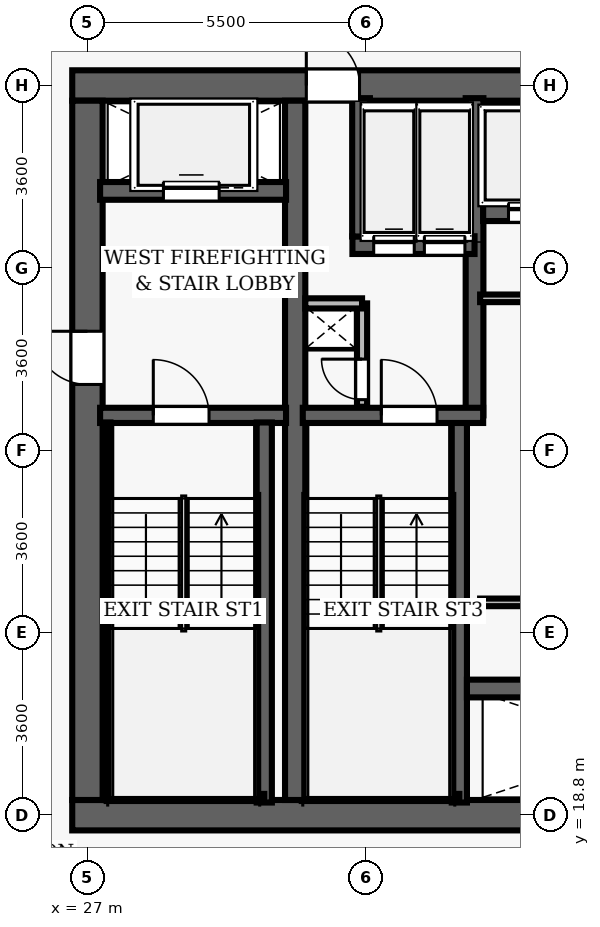
"""IFC4 building model, lengths in metres.
Left out: names, types, materials, properties, quantities, classifications, styles, units other than length and angle.
Written with IfcOpenShell. Run it as: python <this file> out.ifc"""

import sys

from ifc_helpers import new_model, si_unit, direction, frame, frame_2d, origin, place, context, subcontext, project, spatial, rectangle, extrude, element, fill, save


model = new_model("IFC4")
c1 = context("Model", 3, precision=1e-05, world=origin(), true_north=direction((0.0, 1.0)))
c2 = subcontext(c1, "Body", "Model", "MODEL_VIEW")
j1 = project(units=[si_unit("LENGTHUNIT", "METRE"), si_unit("PLANEANGLEUNIT", "RADIAN")], contexts=[c1])
p1 = place(None, origin())
s1 = spatial("IfcSite", under=j1, at=p1, CompositionType="ELEMENT")
p2 = place(p1, origin())
s2 = spatial("IfcBuilding", under=s1, at=p2, CompositionType="ELEMENT")
p3 = place(p2, frame((0.0, 0.0, 72.9)))
s3 = spatial("IfcBuildingStorey", under=s2, at=p3, CompositionType="ELEMENT", Elevation=72.9)
p4 = place(p3, frame((26.7, 18.8, 0.0), z_axis=(0.0, 0.0, 1.0), x_axis=(1.0, 0.0, 0.0)))
e1 = element("IfcWall", 1, at=p4, inside=s3, PredefinedType="SHEAR", context=c2, shape_type="SweptSolid", body=[
    extrude(rectangle(XDim=22.6, YDim=0.6, at=frame_2d((11.3, 0.0))), origin(), (0.0, 0.0, 1.0), 3.5),
])
p5 = place(p4, frame((14.52, 0.0, 0.0)))
e2 = element("IfcOpeningElement", 2, at=p5, cuts=e1, PredefinedType="OPENING", context=c2, shape_type="SweptSolid", body=[
    extrude(rectangle(XDim=1.05, YDim=2.15, at=frame_2d((0.525, 1.075))), frame((0.0, 0.31, 0.0), z_axis=(0.0, -1.0, 0.0), x_axis=(1.0, 0.0, 0.0)), (0.0, 0.0, 1.0), 0.62),
])
p6 = place(p3, frame((26.7, 33.2, 0.0), z_axis=(0.0, 0.0, 1.0), x_axis=(1.0, 0.0, 0.0)))
e3 = element("IfcWall", 3, at=p6, inside=s3, PredefinedType="SHEAR", context=c2, shape_type="SweptSolid", body=[
    extrude(rectangle(XDim=22.6, YDim=0.6, at=frame_2d((11.3, 0.0))), origin(), (0.0, 0.0, 1.0), 3.5),
])
p7 = place(p6, frame((4.62, 0.0, 0.0)))
e4 = element("IfcOpeningElement", 4, at=p7, cuts=e3, PredefinedType="OPENING", context=c2, shape_type="SweptSolid", body=[
    extrude(rectangle(XDim=1.05, YDim=2.15, at=frame_2d((0.525, 1.075))), frame((0.0, 0.31, 0.0), z_axis=(0.0, -1.0, 0.0), x_axis=(1.0, 0.0, 0.0)), (0.0, 0.0, 1.0), 0.62),
])
p8 = place(p6, frame((14.52, 0.0, 0.0)))
e5 = element("IfcOpeningElement", 5, at=p8, cuts=e3, PredefinedType="OPENING", context=c2, shape_type="SweptSolid", body=[
    extrude(rectangle(XDim=1.05, YDim=2.15, at=frame_2d((0.525, 1.075))), frame((0.0, 0.31, 0.0), z_axis=(0.0, -1.0, 0.0), x_axis=(1.0, 0.0, 0.0)), (0.0, 0.0, 1.0), 0.62),
])
p9 = place(p3, frame((27.0, 19.1, 0.0), z_axis=(0.0, 0.0, 1.0), x_axis=(0.0, 1.0, 0.0)))
e6 = element("IfcWall", 6, at=p9, inside=s3, PredefinedType="SHEAR", context=c2, shape_type="SweptSolid", body=[
    extrude(rectangle(XDim=13.8, YDim=0.6, at=frame_2d((6.9, 0.0))), origin(), (0.0, 0.0, 1.0), 3.5),
])
p10 = place(p9, frame((8.2, 0.0, 0.0)))
e7 = element("IfcOpeningElement", 7, at=p10, cuts=e6, PredefinedType="OPENING", context=c2, shape_type="SweptSolid", body=[
    extrude(rectangle(XDim=1.05, YDim=2.15, at=frame_2d((0.525, 1.075))), frame((0.0, 0.31, 0.0), z_axis=(0.0, -1.0, 0.0), x_axis=(1.0, 0.0, 0.0)), (0.0, 0.0, 1.0), 0.62),
])
p11 = place(p3, frame((31.1, 19.1, 0.0), z_axis=(0.0, 0.0, 1.0), x_axis=(0.0, 1.0, 0.0)))
e8 = element("IfcWall", 8, at=p11, inside=s3, PredefinedType="SHEAR", context=c2, shape_type="SweptSolid", body=[
    extrude(rectangle(XDim=13.8, YDim=0.4, at=frame_2d((6.9, 0.0))), origin(), (0.0, 0.0, 1.0), 3.5),
])
p12 = place(p3, frame((27.25, 26.69, 0.0), z_axis=(0.0, 0.0, 1.0), x_axis=(1.0, 0.0, 0.0)))
e9 = element("IfcWall", 9, at=p12, inside=s3, PredefinedType="SHEAR", context=c2, shape_type="SweptSolid", body=[
    extrude(rectangle(XDim=3.67, YDim=0.3, at=frame_2d((1.835, 0.0))), origin(), (0.0, 0.0, 1.0), 3.5),
])
p13 = place(p12, frame((1.05, 0.0, 0.0)))
e10 = element("IfcOpeningElement", 10, at=p13, cuts=e9, PredefinedType="OPENING", context=c2, shape_type="SweptSolid", body=[
    extrude(rectangle(XDim=1.1, YDim=2.15, at=frame_2d((0.55, 1.075))), frame((0.0, 0.16, 0.0), z_axis=(0.0, -1.0, 0.0), x_axis=(1.0, 0.0, 0.0)), (0.0, 0.0, 1.0), 0.32),
])
p14 = place(p3, frame((30.49, 19.05, 0.0), z_axis=(0.0, 0.0, 1.0), x_axis=(0.0, 1.0, 0.0)))
e11 = element("IfcWall", 11, at=p14, inside=s3, PredefinedType="SHEAR", context=c2, shape_type="SweptSolid", body=[
    extrude(rectangle(XDim=7.5, YDim=0.3, at=frame_2d((3.75, 0.0))), origin(), (0.0, 0.0, 1.0), 3.5),
])
p15 = place(p3, frame((27.395, 19.1, 0.0), z_axis=(0.0, 0.0, 1.0), x_axis=(0.0, 1.0, 0.0)))
e12 = element("IfcWall", 12, at=p15, inside=s3, PredefinedType="SHEAR", context=c2, shape_type="SweptSolid", body=[
    extrude(rectangle(XDim=7.45, YDim=0.12, at=frame_2d((3.725, 0.0))), origin(), (0.0, 0.0, 1.0), 3.5),
])
p16 = place(p3, frame((27.395, 19.16, 0.0), z_axis=(0.0, 0.0, 1.0), x_axis=(1.0, 0.0, 0.0)))
e13 = element("IfcWall", 13, at=p16, inside=s3, PredefinedType="SHEAR", context=c2, shape_type="SweptSolid", body=[
    extrude(rectangle(XDim=3.095, YDim=0.12, at=frame_2d((1.547, 0.0))), origin(), (0.0, 0.0, 1.0), 3.5),
])
p17 = place(p3, frame((27.25, 31.12, 0.0), z_axis=(0.0, 0.0, 1.0), x_axis=(1.0, 0.0, 0.0)))
e14 = element("IfcWall", 14, at=p17, inside=s3, PredefinedType="SHEAR", context=c2, shape_type="SweptSolid", body=[
    extrude(rectangle(XDim=3.67, YDim=0.35, at=frame_2d((1.835, 0.0))), origin(), (0.0, 0.0, 1.0), 2.6),
])
p18 = place(p17, frame((1.25, 0.0, 0.0)))
e15 = element("IfcOpeningElement", 15, at=p18, cuts=e14, PredefinedType="OPENING", context=c2, shape_type="SweptSolid", body=[
    extrude(rectangle(XDim=1.1, YDim=2.15, at=frame_2d((0.55, 1.075))), frame((0.0, 0.185, 0.0), z_axis=(0.0, -1.0, 0.0), x_axis=(1.0, 0.0, 0.0)), (0.0, 0.0, 1.0), 0.37),
])
p19 = place(p3, frame((34.34, 19.05, 0.0), z_axis=(0.0, 0.0, 1.0), x_axis=(0.0, 1.0, 0.0)))
e16 = element("IfcWall", 16, at=p19, inside=s3, PredefinedType="SHEAR", context=c2, shape_type="SweptSolid", body=[
    extrude(rectangle(XDim=7.5, YDim=0.3, at=frame_2d((3.75, 0.0))), origin(), (0.0, 0.0, 1.0), 3.5),
])
p20 = place(p3, frame((34.64, 26.69, 0.0), z_axis=(0.0, 0.0, 1.0), x_axis=(0.0, 1.0, 0.0)))
e17 = element("IfcWall", 17, at=p20, inside=s3, PredefinedType="SHEAR", context=c2, shape_type="SweptSolid", body=[
    extrude(rectangle(XDim=6.26, YDim=0.35, at=frame_2d((3.13, 0.0))), origin(), (0.0, 0.0, 1.0), 3.5),
])
p21 = place(p3, frame((31.25, 26.69, 0.0), z_axis=(0.0, 0.0, 1.0), x_axis=(1.0, 0.0, 0.0)))
e18 = element("IfcWall", 18, at=p21, inside=s3, PredefinedType="SHEAR", context=c2, shape_type="SweptSolid", body=[
    extrude(rectangle(XDim=3.56, YDim=0.3, at=frame_2d((1.78, 0.0))), origin(), (0.0, 0.0, 1.0), 3.5),
])
p22 = place(p21, frame((1.55, 0.0, 0.0)))
e19 = element("IfcOpeningElement", 19, at=p22, cuts=e18, PredefinedType="OPENING", context=c2, shape_type="SweptSolid", body=[
    extrude(rectangle(XDim=1.1, YDim=2.15, at=frame_2d((0.55, 1.075))), frame((0.0, 0.16, 0.0), z_axis=(0.0, -1.0, 0.0), x_axis=(1.0, 0.0, 0.0)), (0.0, 0.0, 1.0), 0.32),
])
p23 = place(p3, frame((31.3, 19.16, 0.0), z_axis=(0.0, 0.0, 1.0), x_axis=(1.0, 0.0, 0.0)))
e20 = element("IfcWall", 20, at=p23, inside=s3, PredefinedType="SHEAR", context=c2, shape_type="SweptSolid", body=[
    extrude(rectangle(XDim=3.04, YDim=0.12, at=frame_2d((1.52, 0.0))), origin(), (0.0, 0.0, 1.0), 3.5),
])
p24 = place(p3, frame((32.23, 30.05, 0.0), z_axis=(0.0, 0.0, 1.0), x_axis=(1.0, 0.0, 0.0)))
e21 = element("IfcWall", 21, at=p24, inside=s3, PredefinedType="SHEAR", context=c2, shape_type="SweptSolid", body=[
    extrude(rectangle(XDim=2.41, YDim=0.35, at=frame_2d((1.205, 0.0))), origin(), (0.0, 0.0, 1.0), 2.6),
])
p25 = place(p24, frame((0.42, 0.0, 0.0)))
e22 = element("IfcOpeningElement", 22, at=p25, cuts=e21, PredefinedType="OPENING", context=c2, shape_type="SweptSolid", body=[
    extrude(rectangle(XDim=0.8, YDim=2.15, at=frame_2d((0.4, 1.075))), frame((0.0, 0.185, 0.0), z_axis=(0.0, -1.0, 0.0), x_axis=(1.0, 0.0, 0.0)), (0.0, 0.0, 1.0), 0.37),
])
p26 = place(p24, frame((1.42, 0.0, 0.0)))
e23 = element("IfcOpeningElement", 23, at=p26, cuts=e21, PredefinedType="OPENING", context=c2, shape_type="SweptSolid", body=[
    extrude(rectangle(XDim=0.8, YDim=2.15, at=frame_2d((0.4, 1.075))), frame((0.0, 0.185, 0.0), z_axis=(0.0, -1.0, 0.0), x_axis=(1.0, 0.0, 0.0)), (0.0, 0.0, 1.0), 0.37),
])
p27 = place(p3, frame((32.4, 30.22, 0.0), z_axis=(0.0, 0.0, 1.0), x_axis=(0.0, 1.0, 0.0)))
e24 = element("IfcWall", 24, at=p27, inside=s3, PredefinedType="SHEAR", context=c2, shape_type="SweptSolid", body=[
    extrude(rectangle(XDim=2.73, YDim=0.35, at=frame_2d((1.365, 0.0))), origin(), (0.0, 0.0, 1.0), 2.6),
])
p28 = place(p3, frame((32.42, 26.86, 0.0), z_axis=(0.0, 0.0, 1.0), x_axis=(0.0, 1.0, 0.0)))
e25 = element("IfcWall", 25, at=p28, inside=s3, PredefinedType="PARTITIONING", context=c2, shape_type="SweptSolid", body=[
    extrude(rectangle(XDim=2.04, YDim=0.2, at=frame_2d((1.02, 0.0))), origin(), (0.0, 0.0, 1.0), 2.6),
])
p29 = place(p28, frame((0.14, 0.0, 0.0)))
e26 = element("IfcOpeningElement", 26, at=p29, cuts=e25, PredefinedType="OPENING", context=c2, shape_type="SweptSolid", body=[
    extrude(rectangle(XDim=0.8, YDim=2.05, at=frame_2d((0.4, 1.025))), frame((0.0, 0.11, 0.0), z_axis=(0.0, -1.0, 0.0), x_axis=(1.0, 0.0, 0.0)), (0.0, 0.0, 1.0), 0.22),
])
p30 = place(p3, frame((31.3, 28.9, 0.0), z_axis=(0.0, 0.0, 1.0), x_axis=(1.0, 0.0, 0.0)))
e27 = element("IfcWall", 27, at=p30, inside=s3, PredefinedType="PARTITIONING", context=c2, shape_type="SweptSolid", body=[
    extrude(rectangle(XDim=1.12, YDim=0.2, at=frame_2d((0.56, 0.0))), origin(), (0.0, 0.0, 1.0), 2.6),
])
p31 = place(p3, frame((34.81, 30.7, 0.0), z_axis=(0.0, 0.0, 1.0), x_axis=(1.0, 0.0, 0.0)))
e28 = element("IfcWall", 28, at=p31, inside=s3, PredefinedType="SHEAR", context=c2, shape_type="SweptSolid", body=[
    extrude(rectangle(XDim=6.36, YDim=0.35, at=frame_2d((3.18, 0.0))), origin(), (0.0, 0.0, 1.0), 2.6),
])
p32 = place(p31, frame((0.5, 0.0, 0.0)))
e29 = element("IfcOpeningElement", 29, at=p32, cuts=e28, PredefinedType="OPENING", context=c2, shape_type="SweptSolid", body=[
    extrude(rectangle(XDim=0.9, YDim=2.15, at=frame_2d((0.45, 1.075))), frame((0.0, 0.185, 0.0), z_axis=(0.0, -1.0, 0.0), x_axis=(1.0, 0.0, 0.0)), (0.0, 0.0, 1.0), 0.37),
])
p33 = place(p31, frame((2.58, 0.0, 0.0)))
e30 = element("IfcOpeningElement", 30, at=p33, cuts=e28, PredefinedType="OPENING", context=c2, shape_type="SweptSolid", body=[
    extrude(rectangle(XDim=0.9, YDim=2.15, at=frame_2d((0.45, 1.075))), frame((0.0, 0.185, 0.0), z_axis=(0.0, -1.0, 0.0), x_axis=(1.0, 0.0, 0.0)), (0.0, 0.0, 1.0), 0.37),
])
p34 = place(p31, frame((4.66, 0.0, 0.0)))
e31 = element("IfcOpeningElement", 31, at=p34, cuts=e28, PredefinedType="OPENING", context=c2, shape_type="SweptSolid", body=[
    extrude(rectangle(XDim=0.9, YDim=2.15, at=frame_2d((0.45, 1.075))), frame((0.0, 0.185, 0.0), z_axis=(0.0, -1.0, 0.0), x_axis=(1.0, 0.0, 0.0)), (0.0, 0.0, 1.0), 0.37),
])
p35 = place(p3, frame((34.49, 21.3, 0.0), z_axis=(0.0, 0.0, 1.0), x_axis=(1.0, 0.0, 0.0)))
e32 = element("IfcWall", 32, at=p35, inside=s3, PredefinedType="SHEAR", context=c2, shape_type="SweptSolid", body=[
    extrude(rectangle(XDim=6.68, YDim=0.35, at=frame_2d((3.34, 0.0))), origin(), (0.0, 0.0, 1.0), 2.6),
])
for number, where, z_axis, x_axis in (
    (33, (34.75, 29.0, 0.0), (0.0, 0.0, 1.0), (1.0, 0.0, 0.0)),
    (34, (34.75, 23.0, 0.0), (0.0, 0.0, 1.0), (1.0, 0.0, 0.0)),
):
    element("IfcWall", number, at=place(p3, frame(where, z_axis=z_axis, x_axis=x_axis)), inside=s3, PredefinedType="PARTITIONING", context=c2, shape_type="SweptSolid", body=[
        extrude(rectangle(XDim=6.25, YDim=0.15, at=frame_2d((3.125, 0.0))), origin(), (0.0, 0.0, 1.0), 2.6),
    ])
p36 = place(p13, origin())
e35 = element("IfcDoor", 35, at=p36, inside=s3, OperationType="SINGLE_SWING_LEFT", PredefinedType="DOOR", context=c2, shape_type="SweptSolid", body=[
    extrude(rectangle(XDim=1.1, YDim=2.15, at=frame_2d((0.55, 1.075))), frame((0.0, 0.025, 0.0), z_axis=(0.0, -1.0, 0.0), x_axis=(1.0, 0.0, 0.0)), (0.0, 0.0, 1.0), 0.05),
])
fill(e10, e35)
p37 = place(p10, origin())
e36 = element("IfcDoor", 36, at=p37, inside=s3, OperationType="SINGLE_SWING_RIGHT", PredefinedType="DOOR", context=c2, shape_type="SweptSolid", body=[
    extrude(rectangle(XDim=1.05, YDim=2.15, at=frame_2d((0.525, 1.075))), frame((0.0, 0.025, 0.0), z_axis=(0.0, -1.0, 0.0), x_axis=(1.0, 0.0, 0.0)), (0.0, 0.0, 1.0), 0.05),
])
fill(e7, e36)
p38 = place(p22, origin())
e37 = element("IfcDoor", 37, at=p38, inside=s3, OperationType="SINGLE_SWING_LEFT", PredefinedType="DOOR", context=c2, shape_type="SweptSolid", body=[
    extrude(rectangle(XDim=1.1, YDim=2.15, at=frame_2d((0.55, 1.075))), frame((0.0, 0.025, 0.0), z_axis=(0.0, -1.0, 0.0), x_axis=(1.0, 0.0, 0.0)), (0.0, 0.0, 1.0), 0.05),
])
fill(e19, e37)
p39 = place(p29, origin())
e38 = element("IfcDoor", 38, at=p39, inside=s3, OperationType="SINGLE_SWING_RIGHT", PredefinedType="DOOR", context=c2, shape_type="SweptSolid", body=[
    extrude(rectangle(XDim=0.8, YDim=2.05, at=frame_2d((0.4, 1.025))), frame((0.0, 0.025, 0.0), z_axis=(0.0, -1.0, 0.0), x_axis=(1.0, 0.0, 0.0)), (0.0, 0.0, 1.0), 0.05),
])
fill(e26, e38)
p40 = place(p7, origin())
e39 = element("IfcDoor", 39, at=p40, inside=s3, OperationType="SINGLE_SWING_LEFT", PredefinedType="DOOR", context=c2, shape_type="SweptSolid", body=[
    extrude(rectangle(XDim=1.05, YDim=2.15, at=frame_2d((0.525, 1.075))), frame((0.0, 0.025, 0.0), z_axis=(0.0, -1.0, 0.0), x_axis=(1.0, 0.0, 0.0)), (0.0, 0.0, 1.0), 0.05),
])
fill(e4, e39)
p41 = place(p32, origin())
e40 = element("IfcDoor", 40, at=p41, inside=s3, OperationType="SLIDING_TO_LEFT", PredefinedType="DOOR", context=c2, shape_type="SweptSolid", body=[
    extrude(rectangle(XDim=0.9, YDim=2.15, at=frame_2d((0.45, 1.075))), frame((0.0, 0.025, 0.0), z_axis=(0.0, -1.0, 0.0), x_axis=(1.0, 0.0, 0.0)), (0.0, 0.0, 1.0), 0.05),
])
fill(e29, e40)
p42 = place(p18, origin())
e41 = element("IfcDoor", 41, at=p42, inside=s3, OperationType="SLIDING_TO_LEFT", PredefinedType="DOOR", context=c2, shape_type="SweptSolid", body=[
    extrude(rectangle(XDim=1.1, YDim=2.15, at=frame_2d((0.55, 1.075))), frame((0.0, 0.025, 0.0), z_axis=(0.0, -1.0, 0.0), x_axis=(1.0, 0.0, 0.0)), (0.0, 0.0, 1.0), 0.05),
])
fill(e15, e41)
p43 = place(p25, origin())
e42 = element("IfcDoor", 42, at=p43, inside=s3, OperationType="SLIDING_TO_LEFT", PredefinedType="DOOR", context=c2, shape_type="SweptSolid", body=[
    extrude(rectangle(XDim=0.8, YDim=2.15, at=frame_2d((0.4, 1.075))), frame((0.0, 0.025, 0.0), z_axis=(0.0, -1.0, 0.0), x_axis=(1.0, 0.0, 0.0)), (0.0, 0.0, 1.0), 0.05),
])
fill(e22, e42)
p44 = place(p26, origin())
e43 = element("IfcDoor", 43, at=p44, inside=s3, OperationType="SLIDING_TO_LEFT", PredefinedType="DOOR", context=c2, shape_type="SweptSolid", body=[
    extrude(rectangle(XDim=0.8, YDim=2.15, at=frame_2d((0.4, 1.075))), frame((0.0, 0.025, 0.0), z_axis=(0.0, -1.0, 0.0), x_axis=(1.0, 0.0, 0.0)), (0.0, 0.0, 1.0), 0.05),
])
fill(e23, e43)
save(model, sys.argv[1])
